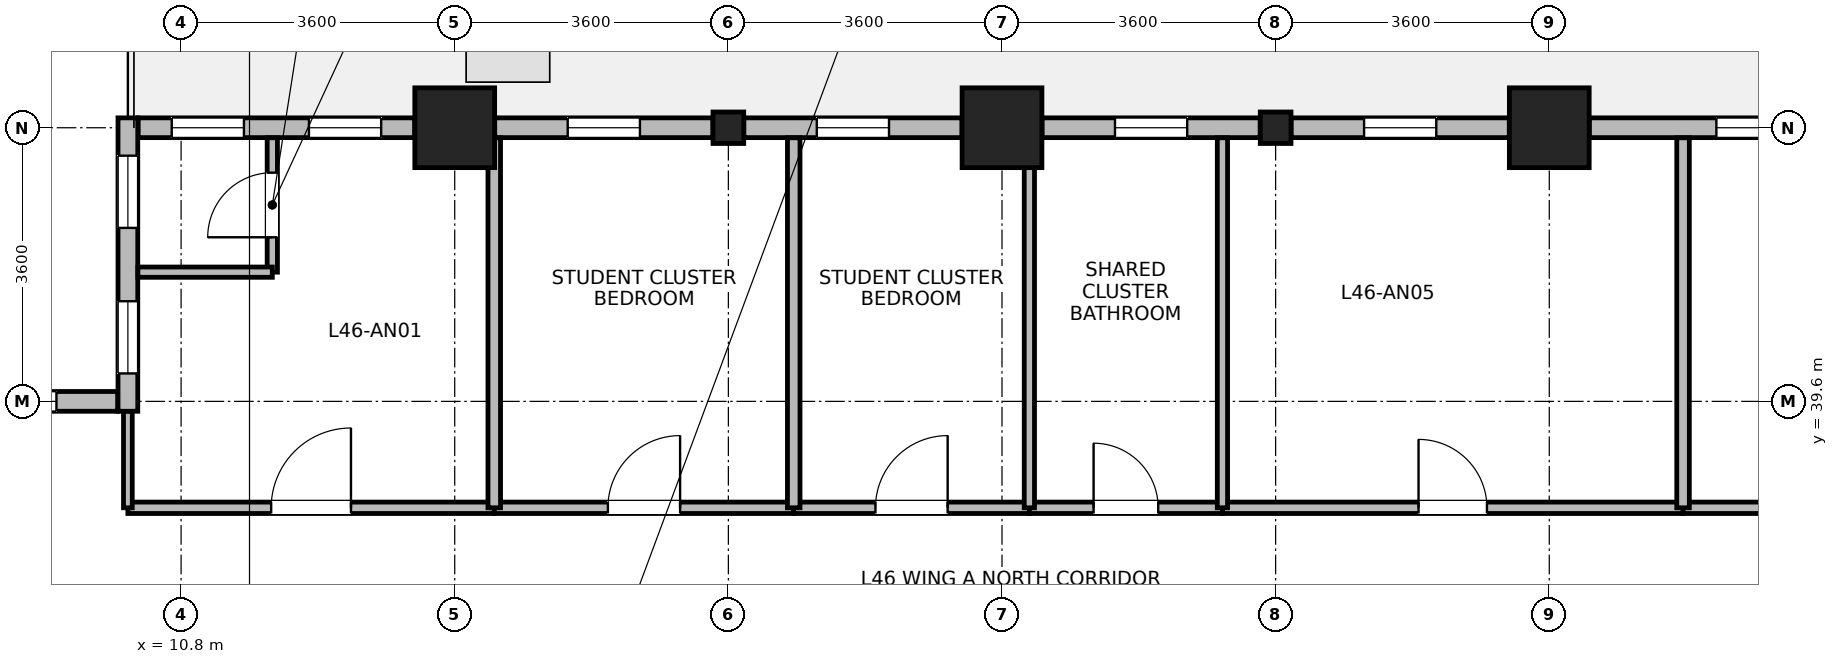
"""IFC4 building model, lengths in metres.
Left out: names, types, materials, properties, quantities, classifications, styles, units other than length and angle.
Written with IfcOpenShell. Run it as: python <this file> out.ifc"""

import sys

from ifc_helpers import new_model, si_unit, direction, frame, frame_2d, origin, origin_2d, place, context, subcontext, project, spatial, rectangle, i_section, extrude, source, transform, mapped, element, fill, save


model = new_model("IFC4")
c1 = context("Model", 3, precision=1e-05, world=origin(), true_north=direction((0.0, 1.0)))
c2 = subcontext(c1, "Body", "Model", "MODEL_VIEW")
j1 = project(units=[si_unit("LENGTHUNIT", "METRE"), si_unit("PLANEANGLEUNIT", "RADIAN")], contexts=[c1])
p1 = place(None, origin())
s1 = spatial("IfcSite", under=j1, at=p1, CompositionType="ELEMENT")
p2 = place(p1, origin())
s2 = spatial("IfcBuilding", under=s1, at=p2, CompositionType="ELEMENT")
p3 = place(p2, frame((0.0, 0.0, 180.9)))
s3 = spatial("IfcBuildingStorey", under=s2, at=p3, CompositionType="ELEMENT", Elevation=180.9)
m1 = source(origin(), c2, "Body", "SweptSolid", [
    extrude(rectangle(XDim=1.05, YDim=1.05, at=origin_2d()), origin(), (0.0, 0.0, 1.0), 3.7),
])
for number, where, z_axis, x_axis in (
    (1, (14.4, 43.2, 0.0), (0.0, 0.0, 1.0), (1.0, 0.0, 0.0)),
    (2, (21.6, 43.2, 0.0), (0.0, 0.0, 1.0), (1.0, 0.0, 0.0)),
    (3, (28.8, 43.2, 0.0), (0.0, 0.0, 1.0), (1.0, 0.0, 0.0)),
):
    element("IfcColumn", number, at=place(p3, frame(where, z_axis=z_axis, x_axis=x_axis)), inside=s3, PredefinedType="COLUMN", context=c2, shape_type="MappedRepresentation", body=[
        mapped(m1, transform((0.0, 0.0, 0.0), x_axis=(1.0, 0.0, 0.0), y_axis=(0.0, 1.0, 0.0), z_axis=(0.0, 0.0, 1.0), scale=1.0)),
    ])
m2 = source(origin(), c2, "Body", "SweptSolid", [
    extrude(i_section(OverallWidth=0.404, OverallDepth=0.414, WebThickness=0.021, FlangeThickness=0.028, FilletRadius=0.015, at=origin_2d()), origin(), (0.0, 0.0, 1.0), 3.7),
])
for number, where, z_axis, x_axis in (
    (4, (18.0, 43.2, 0.0), (0.0, 0.0, 1.0), (1.0, 0.0, 0.0)),
    (5, (25.2, 43.2, 0.0), (0.0, 0.0, 1.0), (1.0, 0.0, 0.0)),
):
    element("IfcColumn", number, at=place(p3, frame(where, z_axis=z_axis, x_axis=x_axis)), inside=s3, PredefinedType="COLUMN", context=c2, shape_type="MappedRepresentation", body=[
        mapped(m2, transform((0.0, 0.0, 0.0), x_axis=(1.0, 0.0, 0.0), y_axis=(0.0, 1.0, 0.0), z_axis=(0.0, 0.0, 1.0), scale=1.0)),
    ])
p4 = place(p3, frame((29.326, 43.2, 0.0), z_axis=(0.0, 0.0, 1.0), x_axis=(1.0, 0.0, 0.0)))
e6 = element("IfcWall", 6, at=p4, inside=s3, PredefinedType="STANDARD", context=c2, shape_type="SweptSolid", body=[
    extrude(rectangle(XDim=2.871, YDim=0.26, at=frame_2d((1.436, 0.0))), origin(), (0.0, 0.0, 1.0), 2.99),
])
p5 = place(p4, frame((1.673, 0.0, 0.85)))
e7 = element("IfcOpeningElement", 7, at=p5, cuts=e6, PredefinedType="OPENING", context=c2, shape_type="SweptSolid", body=[
    extrude(rectangle(XDim=0.95, YDim=1.75, at=frame_2d((0.475, 0.875))), frame((0.0, 0.14, 0.0), z_axis=(0.0, -1.0, 0.0), x_axis=(1.0, 0.0, 0.0)), (0.0, 0.0, 1.0), 0.28),
])
p6 = place(p3, frame((25.403, 43.2, 0.0), z_axis=(0.0, 0.0, 1.0), x_axis=(1.0, 0.0, 0.0)))
e8 = element("IfcWall", 8, at=p6, inside=s3, PredefinedType="STANDARD", context=c2, shape_type="SweptSolid", body=[
    extrude(rectangle(XDim=2.871, YDim=0.26, at=frame_2d((1.436, 0.0))), origin(), (0.0, 0.0, 1.0), 2.99),
])
p7 = place(p6, frame((0.96, 0.0, 0.85)))
e9 = element("IfcOpeningElement", 9, at=p7, cuts=e8, PredefinedType="OPENING", context=c2, shape_type="SweptSolid", body=[
    extrude(rectangle(XDim=0.95, YDim=1.75, at=frame_2d((0.475, 0.875))), frame((0.0, 0.14, 0.0), z_axis=(0.0, -1.0, 0.0), x_axis=(1.0, 0.0, 0.0)), (0.0, 0.0, 1.0), 0.28),
])
p8 = place(p3, frame((22.126, 43.2, 0.0), z_axis=(0.0, 0.0, 1.0), x_axis=(1.0, 0.0, 0.0)))
e10 = element("IfcWall", 10, at=p8, inside=s3, PredefinedType="STANDARD", context=c2, shape_type="SweptSolid", body=[
    extrude(rectangle(XDim=2.871, YDim=0.26, at=frame_2d((1.436, 0.0))), origin(), (0.0, 0.0, 1.0), 2.99),
])
p9 = place(p8, frame((0.96, 0.0, 0.85)))
e11 = element("IfcOpeningElement", 11, at=p9, cuts=e10, PredefinedType="OPENING", context=c2, shape_type="SweptSolid", body=[
    extrude(rectangle(XDim=0.95, YDim=1.75, at=frame_2d((0.475, 0.875))), frame((0.0, 0.14, 0.0), z_axis=(0.0, -1.0, 0.0), x_axis=(1.0, 0.0, 0.0)), (0.0, 0.0, 1.0), 0.28),
])
p10 = place(p3, frame((18.203, 43.2, 0.0), z_axis=(0.0, 0.0, 1.0), x_axis=(1.0, 0.0, 0.0)))
e12 = element("IfcWall", 12, at=p10, inside=s3, PredefinedType="STANDARD", context=c2, shape_type="SweptSolid", body=[
    extrude(rectangle(XDim=2.871, YDim=0.26, at=frame_2d((1.436, 0.0))), origin(), (0.0, 0.0, 1.0), 2.99),
])
p11 = place(p10, frame((0.96, 0.0, 0.85)))
e13 = element("IfcOpeningElement", 13, at=p11, cuts=e12, PredefinedType="OPENING", context=c2, shape_type="SweptSolid", body=[
    extrude(rectangle(XDim=0.95, YDim=1.75, at=frame_2d((0.475, 0.875))), frame((0.0, 0.14, 0.0), z_axis=(0.0, -1.0, 0.0), x_axis=(1.0, 0.0, 0.0)), (0.0, 0.0, 1.0), 0.28),
])
p12 = place(p3, frame((14.926, 43.2, 0.0), z_axis=(0.0, 0.0, 1.0), x_axis=(1.0, 0.0, 0.0)))
e14 = element("IfcWall", 14, at=p12, inside=s3, PredefinedType="STANDARD", context=c2, shape_type="SweptSolid", body=[
    extrude(rectangle(XDim=2.871, YDim=0.26, at=frame_2d((1.436, 0.0))), origin(), (0.0, 0.0, 1.0), 2.99),
])
p13 = place(p12, frame((0.96, 0.0, 0.85)))
e15 = element("IfcOpeningElement", 15, at=p13, cuts=e14, PredefinedType="OPENING", context=c2, shape_type="SweptSolid", body=[
    extrude(rectangle(XDim=0.95, YDim=1.75, at=frame_2d((0.475, 0.875))), frame((0.0, 0.14, 0.0), z_axis=(0.0, -1.0, 0.0), x_axis=(1.0, 0.0, 0.0)), (0.0, 0.0, 1.0), 0.28),
])
p14 = place(p3, frame((10.235, 43.2, 0.0), z_axis=(0.0, 0.0, 1.0), x_axis=(1.0, 0.0, 0.0)))
e16 = element("IfcWall", 16, at=p14, inside=s3, PredefinedType="STANDARD", context=c2, shape_type="SweptSolid", body=[
    extrude(rectangle(XDim=3.639, YDim=0.26, at=frame_2d((1.819, 0.0))), origin(), (0.0, 0.0, 1.0), 3.44),
])
p15 = place(p14, frame((0.442, 0.0, 0.85)))
e17 = element("IfcOpeningElement", 17, at=p15, cuts=e16, PredefinedType="OPENING", context=c2, shape_type="SweptSolid", body=[
    extrude(rectangle(XDim=0.95, YDim=1.75, at=frame_2d((0.475, 0.875))), frame((0.0, 0.14, 0.0), z_axis=(0.0, -1.0, 0.0), x_axis=(1.0, 0.0, 0.0)), (0.0, 0.0, 1.0), 0.28),
])
p16 = place(p14, frame((2.247, 0.0, 0.85)))
e18 = element("IfcOpeningElement", 18, at=p16, cuts=e16, PredefinedType="OPENING", context=c2, shape_type="SweptSolid", body=[
    extrude(rectangle(XDim=0.95, YDim=1.75, at=frame_2d((0.475, 0.875))), frame((0.0, 0.14, 0.0), z_axis=(0.0, -1.0, 0.0), x_axis=(1.0, 0.0, 0.0)), (0.0, 0.0, 1.0), 0.28),
])
p17 = place(p3, frame((10.1, 39.47, 0.0), z_axis=(0.0, 0.0, 1.0), x_axis=(0.0, 1.0, 0.0)))
e19 = element("IfcWall", 19, at=p17, inside=s3, PredefinedType="STANDARD", context=c2, shape_type="SweptSolid", body=[
    extrude(rectangle(XDim=3.86, YDim=0.26, at=frame_2d((1.93, 0.0))), origin(), (0.0, 0.0, 1.0), 3.44),
])
p18 = place(p17, frame((0.498, 0.0, 0.85)))
e20 = element("IfcOpeningElement", 20, at=p18, cuts=e19, PredefinedType="OPENING", context=c2, shape_type="SweptSolid", body=[
    extrude(rectangle(XDim=0.95, YDim=1.75, at=frame_2d((0.475, 0.875))), frame((0.0, 0.14, 0.0), z_axis=(0.0, -1.0, 0.0), x_axis=(1.0, 0.0, 0.0)), (0.0, 0.0, 1.0), 0.28),
])
p19 = place(p17, frame((2.412, 0.0, 0.85)))
e21 = element("IfcOpeningElement", 21, at=p19, cuts=e19, PredefinedType="OPENING", context=c2, shape_type="SweptSolid", body=[
    extrude(rectangle(XDim=0.95, YDim=1.75, at=frame_2d((0.475, 0.875))), frame((0.0, 0.14, 0.0), z_axis=(0.0, -1.0, 0.0), x_axis=(1.0, 0.0, 0.0)), (0.0, 0.0, 1.0), 0.28),
])
p20 = place(p3, frame((0.635, 39.6, 0.0), z_axis=(0.0, 0.0, 1.0), x_axis=(1.0, 0.0, 0.0)))
e22 = element("IfcWall", 22, at=p20, inside=s3, PredefinedType="STANDARD", context=c2, shape_type="SweptSolid", body=[
    extrude(rectangle(XDim=9.33, YDim=0.26, at=frame_2d((4.665, 0.0))), origin(), (0.0, 0.0, 1.0), 3.44),
])
p21 = place(p20, frame((0.805, 0.0, 0.85)))
e23 = element("IfcOpeningElement", 23, at=p21, cuts=e22, PredefinedType="OPENING", context=c2, shape_type="SweptSolid", body=[
    extrude(rectangle(XDim=1.5, YDim=1.85, at=frame_2d((0.75, 0.925))), frame((0.0, 0.14, 0.0), z_axis=(0.0, -1.0, 0.0), x_axis=(1.0, 0.0, 0.0)), (0.0, 0.0, 1.0), 0.28),
])
p22 = place(p20, frame((3.915, 0.0, 0.85)))
e24 = element("IfcOpeningElement", 24, at=p22, cuts=e22, PredefinedType="OPENING", context=c2, shape_type="SweptSolid", body=[
    extrude(rectangle(XDim=1.5, YDim=1.85, at=frame_2d((0.75, 0.925))), frame((0.0, 0.14, 0.0), z_axis=(0.0, -1.0, 0.0), x_axis=(1.0, 0.0, 0.0)), (0.0, 0.0, 1.0), 0.28),
])
p23 = place(p20, frame((7.025, 0.0, 0.85)))
e25 = element("IfcOpeningElement", 25, at=p23, cuts=e22, PredefinedType="OPENING", context=c2, shape_type="SweptSolid", body=[
    extrude(rectangle(XDim=1.5, YDim=1.85, at=frame_2d((0.75, 0.925))), frame((0.0, 0.14, 0.0), z_axis=(0.0, -1.0, 0.0), x_axis=(1.0, 0.0, 0.0)), (0.0, 0.0, 1.0), 0.28),
])
p24 = place(p3, frame((12.0, 41.3, 0.0), z_axis=(0.0, 0.0, 1.0), x_axis=(0.0, 1.0, 0.0)))
e26 = element("IfcWall", 26, at=p24, inside=s3, PredefinedType="PARTITIONING", context=c2, shape_type="SweptSolid", body=[
    extrude(rectangle(XDim=1.768, YDim=0.135, at=frame_2d((0.884, 0.0))), origin(), (0.0, 0.0, 1.0), 3.44),
])
p25 = place(p24, frame((0.459, 0.0, 0.0)))
e27 = element("IfcOpeningElement", 27, at=p25, cuts=e26, PredefinedType="OPENING", context=c2, shape_type="SweptSolid", body=[
    extrude(rectangle(XDim=0.85, YDim=2.04, at=frame_2d((0.425, 1.02))), frame((0.0, 0.078, 0.0), z_axis=(0.0, -1.0, 0.0), x_axis=(1.0, 0.0, 0.0)), (0.0, 0.0, 1.0), 0.155),
])
p26 = place(p3, frame((10.232, 41.3, 0.0), z_axis=(0.0, 0.0, 1.0), x_axis=(1.0, 0.0, 0.0)))
e28 = element("IfcWall", 28, at=p26, inside=s3, PredefinedType="PARTITIONING", context=c2, shape_type="SweptSolid", body=[
    extrude(rectangle(XDim=1.768, YDim=0.135, at=frame_2d((0.884, 0.0))), origin(), (0.0, 0.0, 1.0), 3.44),
])
p27 = place(p3, frame((24.5, 38.2, 0.0), z_axis=(0.0, 0.0, 1.0), x_axis=(1.0, 0.0, 0.0)))
e29 = element("IfcWall", 29, at=p27, inside=s3, PredefinedType="PARTITIONING", context=c2, shape_type="SweptSolid", body=[
    extrude(rectangle(XDim=6.06, YDim=0.15, at=frame_2d((3.03, 0.0))), origin(), (0.0, 0.0, 1.0), 3.44),
])
p28 = place(p27, frame((2.58, 0.0, 0.0)))
e30 = element("IfcOpeningElement", 30, at=p28, cuts=e29, PredefinedType="OPENING", context=c2, shape_type="SweptSolid", body=[
    extrude(rectangle(XDim=0.9, YDim=2.08, at=frame_2d((0.45, 1.04))), frame((0.0, 0.085, 0.0), z_axis=(0.0, -1.0, 0.0), x_axis=(1.0, 0.0, 0.0)), (0.0, 0.0, 1.0), 0.17),
])
p29 = place(p3, frame((10.1, 38.2, 0.0), z_axis=(0.0, 0.0, 1.0), x_axis=(1.0, 0.0, 0.0)))
e31 = element("IfcWall", 31, at=p29, inside=s3, PredefinedType="PARTITIONING", context=c2, shape_type="SweptSolid", body=[
    extrude(rectangle(XDim=4.82, YDim=0.15, at=frame_2d((2.41, 0.0))), origin(), (0.0, 0.0, 1.0), 3.44),
])
p30 = place(p29, frame((1.885, 0.0, 0.0)))
e32 = element("IfcOpeningElement", 32, at=p30, cuts=e31, PredefinedType="OPENING", context=c2, shape_type="SweptSolid", body=[
    extrude(rectangle(XDim=1.05, YDim=2.12, at=frame_2d((0.525, 1.06))), frame((0.0, 0.085, 0.0), z_axis=(0.0, -1.0, 0.0), x_axis=(1.0, 0.0, 0.0)), (0.0, 0.0, 1.0), 0.17),
])
p31 = place(p3, frame((30.56, 38.2, 0.0), z_axis=(0.0, 0.0, 1.0), x_axis=(1.0, 0.0, 0.0)))
e33 = element("IfcWall", 33, at=p31, inside=s3, PredefinedType="PARTITIONING", context=c2, shape_type="SweptSolid", body=[
    extrude(rectangle(XDim=4.8, YDim=0.15, at=frame_2d((2.4, 0.0))), origin(), (0.0, 0.0, 1.0), 3.44),
])
p32 = place(p31, frame((1.75, 0.0, 0.0)))
e34 = element("IfcOpeningElement", 34, at=p32, cuts=e33, PredefinedType="OPENING", context=c2, shape_type="SweptSolid", body=[
    extrude(rectangle(XDim=1.3, YDim=2.12, at=frame_2d((0.65, 1.06))), frame((0.0, 0.085, 0.0), z_axis=(0.0, -1.0, 0.0), x_axis=(1.0, 0.0, 0.0)), (0.0, 0.0, 1.0), 0.17),
])
p33 = place(p3, frame((14.92, 38.2, 0.0), z_axis=(0.0, 0.0, 1.0), x_axis=(1.0, 0.0, 0.0)))
e35 = element("IfcWall", 35, at=p33, inside=s3, PredefinedType="PARTITIONING", context=c2, shape_type="SweptSolid", body=[
    extrude(rectangle(XDim=3.94, YDim=0.15, at=frame_2d((1.97, 0.0))), origin(), (0.0, 0.0, 1.0), 3.44),
])
p34 = place(p33, frame((1.495, 0.0, 0.0)))
e36 = element("IfcOpeningElement", 36, at=p34, cuts=e35, PredefinedType="OPENING", context=c2, shape_type="SweptSolid", body=[
    extrude(rectangle(XDim=0.95, YDim=2.1, at=frame_2d((0.475, 1.05))), frame((0.0, 0.085, 0.0), z_axis=(0.0, -1.0, 0.0), x_axis=(1.0, 0.0, 0.0)), (0.0, 0.0, 1.0), 0.17),
])
p35 = place(p3, frame((18.86, 38.2, 0.0), z_axis=(0.0, 0.0, 1.0), x_axis=(1.0, 0.0, 0.0)))
e37 = element("IfcWall", 37, at=p35, inside=s3, PredefinedType="PARTITIONING", context=c2, shape_type="SweptSolid", body=[
    extrude(rectangle(XDim=3.1, YDim=0.15, at=frame_2d((1.55, 0.0))), origin(), (0.0, 0.0, 1.0), 3.44),
])
p36 = place(p35, frame((1.075, 0.0, 0.0)))
e38 = element("IfcOpeningElement", 38, at=p36, cuts=e37, PredefinedType="OPENING", context=c2, shape_type="SweptSolid", body=[
    extrude(rectangle(XDim=0.95, YDim=2.1, at=frame_2d((0.475, 1.05))), frame((0.0, 0.085, 0.0), z_axis=(0.0, -1.0, 0.0), x_axis=(1.0, 0.0, 0.0)), (0.0, 0.0, 1.0), 0.17),
])
p37 = place(p3, frame((21.96, 38.2, 0.0), z_axis=(0.0, 0.0, 1.0), x_axis=(1.0, 0.0, 0.0)))
e39 = element("IfcWall", 39, at=p37, inside=s3, PredefinedType="PARTITIONING", context=c2, shape_type="SweptSolid", body=[
    extrude(rectangle(XDim=2.54, YDim=0.15, at=frame_2d((1.27, 0.0))), origin(), (0.0, 0.0, 1.0), 3.44),
])
p38 = place(p37, frame((0.845, 0.0, 0.0)))
e40 = element("IfcOpeningElement", 40, at=p38, cuts=e39, PredefinedType="OPENING", context=c2, shape_type="SweptSolid", body=[
    extrude(rectangle(XDim=0.85, YDim=2.04, at=frame_2d((0.425, 1.02))), frame((0.0, 0.085, 0.0), z_axis=(0.0, -1.0, 0.0), x_axis=(1.0, 0.0, 0.0)), (0.0, 0.0, 1.0), 0.17),
])
for number, where, z_axis, x_axis in (
    (41, (14.92, 38.2, 0.0), (0.0, 0.0, 1.0), (0.0, 1.0, 0.0)),
    (42, (18.86, 38.2, 0.0), (0.0, 0.0, 1.0), (0.0, 1.0, 0.0)),
):
    element("IfcWall", number, at=place(p3, frame(where, z_axis=z_axis, x_axis=x_axis)), inside=s3, PredefinedType="PARTITIONING", context=c2, shape_type="SweptSolid", body=[
        extrude(rectangle(XDim=4.868, YDim=0.165, at=frame_2d((2.434, 0.0))), origin(), (0.0, 0.0, 1.0), 3.44),
    ])
for number, where, z_axis, x_axis in (
    (43, (21.96, 38.2, 0.0), (0.0, 0.0, 1.0), (0.0, 1.0, 0.0)),
    (44, (24.5, 38.2, 0.0), (0.0, 0.0, 1.0), (0.0, 1.0, 0.0)),
):
    element("IfcWall", number, at=place(p3, frame(where, z_axis=z_axis, x_axis=x_axis)), inside=s3, PredefinedType="PARTITIONING", context=c2, shape_type="SweptSolid", body=[
        extrude(rectangle(XDim=4.868, YDim=0.135, at=frame_2d((2.434, 0.0))), origin(), (0.0, 0.0, 1.0), 3.44),
    ])
p39 = place(p3, frame((30.56, 38.2, 0.0), z_axis=(0.0, 0.0, 1.0), x_axis=(0.0, 1.0, 0.0)))
e45 = element("IfcWall", 45, at=p39, inside=s3, PredefinedType="PARTITIONING", context=c2, shape_type="SweptSolid", body=[
    extrude(rectangle(XDim=4.868, YDim=0.165, at=frame_2d((2.434, 0.0))), origin(), (0.0, 0.0, 1.0), 3.44),
])
p40 = place(p3, frame((10.1, 38.2, 0.0), z_axis=(0.0, 0.0, 1.0), x_axis=(0.0, 1.0, 0.0)))
e46 = element("IfcWall", 46, at=p40, inside=s3, PredefinedType="PARTITIONING", context=c2, shape_type="SweptSolid", body=[
    extrude(rectangle(XDim=1.268, YDim=0.115, at=frame_2d((0.634, 0.0))), origin(), (0.0, 0.0, 1.0), 3.44),
])
p41 = place(p5, origin())
e47 = element("IfcWindow", 47, at=p41, inside=s3, PartitioningType="SINGLE_PANEL", PredefinedType="WINDOW", context=c2, shape_type="SweptSolid", body=[
    extrude(rectangle(XDim=0.95, YDim=1.75, at=frame_2d((0.475, 0.875))), frame((0.0, 0.03, 0.0), z_axis=(0.0, -1.0, 0.0), x_axis=(1.0, 0.0, 0.0)), (0.0, 0.0, 1.0), 0.06),
])
fill(e7, e47)
p42 = place(p7, origin())
e48 = element("IfcWindow", 48, at=p42, inside=s3, PartitioningType="SINGLE_PANEL", PredefinedType="WINDOW", context=c2, shape_type="SweptSolid", body=[
    extrude(rectangle(XDim=0.95, YDim=1.75, at=frame_2d((0.475, 0.875))), frame((0.0, 0.03, 0.0), z_axis=(0.0, -1.0, 0.0), x_axis=(1.0, 0.0, 0.0)), (0.0, 0.0, 1.0), 0.06),
])
fill(e9, e48)
p43 = place(p9, origin())
e49 = element("IfcWindow", 49, at=p43, inside=s3, PartitioningType="SINGLE_PANEL", PredefinedType="WINDOW", context=c2, shape_type="SweptSolid", body=[
    extrude(rectangle(XDim=0.95, YDim=1.75, at=frame_2d((0.475, 0.875))), frame((0.0, 0.03, 0.0), z_axis=(0.0, -1.0, 0.0), x_axis=(1.0, 0.0, 0.0)), (0.0, 0.0, 1.0), 0.06),
])
fill(e11, e49)
p44 = place(p11, origin())
e50 = element("IfcWindow", 50, at=p44, inside=s3, PartitioningType="SINGLE_PANEL", PredefinedType="WINDOW", context=c2, shape_type="SweptSolid", body=[
    extrude(rectangle(XDim=0.95, YDim=1.75, at=frame_2d((0.475, 0.875))), frame((0.0, 0.03, 0.0), z_axis=(0.0, -1.0, 0.0), x_axis=(1.0, 0.0, 0.0)), (0.0, 0.0, 1.0), 0.06),
])
fill(e13, e50)
p45 = place(p13, origin())
e51 = element("IfcWindow", 51, at=p45, inside=s3, PartitioningType="SINGLE_PANEL", PredefinedType="WINDOW", context=c2, shape_type="SweptSolid", body=[
    extrude(rectangle(XDim=0.95, YDim=1.75, at=frame_2d((0.475, 0.875))), frame((0.0, 0.03, 0.0), z_axis=(0.0, -1.0, 0.0), x_axis=(1.0, 0.0, 0.0)), (0.0, 0.0, 1.0), 0.06),
])
fill(e15, e51)
p46 = place(p15, origin())
e52 = element("IfcWindow", 52, at=p46, inside=s3, PartitioningType="SINGLE_PANEL", PredefinedType="WINDOW", context=c2, shape_type="SweptSolid", body=[
    extrude(rectangle(XDim=0.95, YDim=1.75, at=frame_2d((0.475, 0.875))), frame((0.0, 0.03, 0.0), z_axis=(0.0, -1.0, 0.0), x_axis=(1.0, 0.0, 0.0)), (0.0, 0.0, 1.0), 0.06),
])
fill(e17, e52)
p47 = place(p16, origin())
e53 = element("IfcWindow", 53, at=p47, inside=s3, PartitioningType="SINGLE_PANEL", PredefinedType="WINDOW", context=c2, shape_type="SweptSolid", body=[
    extrude(rectangle(XDim=0.95, YDim=1.75, at=frame_2d((0.475, 0.875))), frame((0.0, 0.03, 0.0), z_axis=(0.0, -1.0, 0.0), x_axis=(1.0, 0.0, 0.0)), (0.0, 0.0, 1.0), 0.06),
])
fill(e18, e53)
p48 = place(p18, origin())
e54 = element("IfcWindow", 54, at=p48, inside=s3, PartitioningType="SINGLE_PANEL", PredefinedType="WINDOW", context=c2, shape_type="SweptSolid", body=[
    extrude(rectangle(XDim=0.95, YDim=1.75, at=frame_2d((0.475, 0.875))), frame((0.0, 0.03, 0.0), z_axis=(0.0, -1.0, 0.0), x_axis=(1.0, 0.0, 0.0)), (0.0, 0.0, 1.0), 0.06),
])
fill(e20, e54)
p49 = place(p19, origin())
e55 = element("IfcWindow", 55, at=p49, inside=s3, PartitioningType="SINGLE_PANEL", PredefinedType="WINDOW", context=c2, shape_type="SweptSolid", body=[
    extrude(rectangle(XDim=0.95, YDim=1.75, at=frame_2d((0.475, 0.875))), frame((0.0, 0.03, 0.0), z_axis=(0.0, -1.0, 0.0), x_axis=(1.0, 0.0, 0.0)), (0.0, 0.0, 1.0), 0.06),
])
fill(e21, e55)
p50 = place(p23, origin())
e56 = element("IfcWindow", 56, at=p50, inside=s3, PartitioningType="SINGLE_PANEL", PredefinedType="WINDOW", context=c2, shape_type="SweptSolid", body=[
    extrude(rectangle(XDim=1.5, YDim=1.85, at=frame_2d((0.75, 0.925))), frame((0.0, 0.03, 0.0), z_axis=(0.0, -1.0, 0.0), x_axis=(1.0, 0.0, 0.0)), (0.0, 0.0, 1.0), 0.06),
])
fill(e25, e56)
p51 = place(p25, origin())
e57 = element("IfcDoor", 57, at=p51, inside=s3, OperationType="SINGLE_SWING_LEFT", PredefinedType="DOOR", context=c2, shape_type="SweptSolid", body=[
    extrude(rectangle(XDim=0.85, YDim=2.04, at=frame_2d((0.425, 1.02))), frame((0.0, 0.025, 0.0), z_axis=(0.0, -1.0, 0.0), x_axis=(1.0, 0.0, 0.0)), (0.0, 0.0, 1.0), 0.05),
])
fill(e27, e57)
p52 = place(p28, origin())
e58 = element("IfcDoor", 58, at=p52, inside=s3, OperationType="SINGLE_SWING_LEFT", PredefinedType="DOOR", context=c2, shape_type="SweptSolid", body=[
    extrude(rectangle(XDim=0.9, YDim=2.08, at=frame_2d((0.45, 1.04))), frame((0.0, 0.025, 0.0), z_axis=(0.0, -1.0, 0.0), x_axis=(1.0, 0.0, 0.0)), (0.0, 0.0, 1.0), 0.05),
])
fill(e30, e58)
p53 = place(p30, origin())
e59 = element("IfcDoor", 59, at=p53, inside=s3, OperationType="SINGLE_SWING_RIGHT", PredefinedType="DOOR", context=c2, shape_type="SweptSolid", body=[
    extrude(rectangle(XDim=1.05, YDim=2.12, at=frame_2d((0.525, 1.06))), frame((0.0, 0.025, 0.0), z_axis=(0.0, -1.0, 0.0), x_axis=(1.0, 0.0, 0.0)), (0.0, 0.0, 1.0), 0.05),
])
fill(e32, e59)
p54 = place(p34, origin())
e60 = element("IfcDoor", 60, at=p54, inside=s3, OperationType="SINGLE_SWING_RIGHT", PredefinedType="DOOR", context=c2, shape_type="SweptSolid", body=[
    extrude(rectangle(XDim=0.95, YDim=2.1, at=frame_2d((0.475, 1.05))), frame((0.0, 0.025, 0.0), z_axis=(0.0, -1.0, 0.0), x_axis=(1.0, 0.0, 0.0)), (0.0, 0.0, 1.0), 0.05),
])
fill(e36, e60)
p55 = place(p36, origin())
e61 = element("IfcDoor", 61, at=p55, inside=s3, OperationType="SINGLE_SWING_RIGHT", PredefinedType="DOOR", context=c2, shape_type="SweptSolid", body=[
    extrude(rectangle(XDim=0.95, YDim=2.1, at=frame_2d((0.475, 1.05))), frame((0.0, 0.025, 0.0), z_axis=(0.0, -1.0, 0.0), x_axis=(1.0, 0.0, 0.0)), (0.0, 0.0, 1.0), 0.05),
])
fill(e38, e61)
p56 = place(p38, origin())
e62 = element("IfcDoor", 62, at=p56, inside=s3, OperationType="SINGLE_SWING_LEFT", PredefinedType="DOOR", context=c2, shape_type="SweptSolid", body=[
    extrude(rectangle(XDim=0.85, YDim=2.04, at=frame_2d((0.425, 1.02))), frame((0.0, 0.025, 0.0), z_axis=(0.0, -1.0, 0.0), x_axis=(1.0, 0.0, 0.0)), (0.0, 0.0, 1.0), 0.05),
])
fill(e40, e62)
save(model, sys.argv[1])
